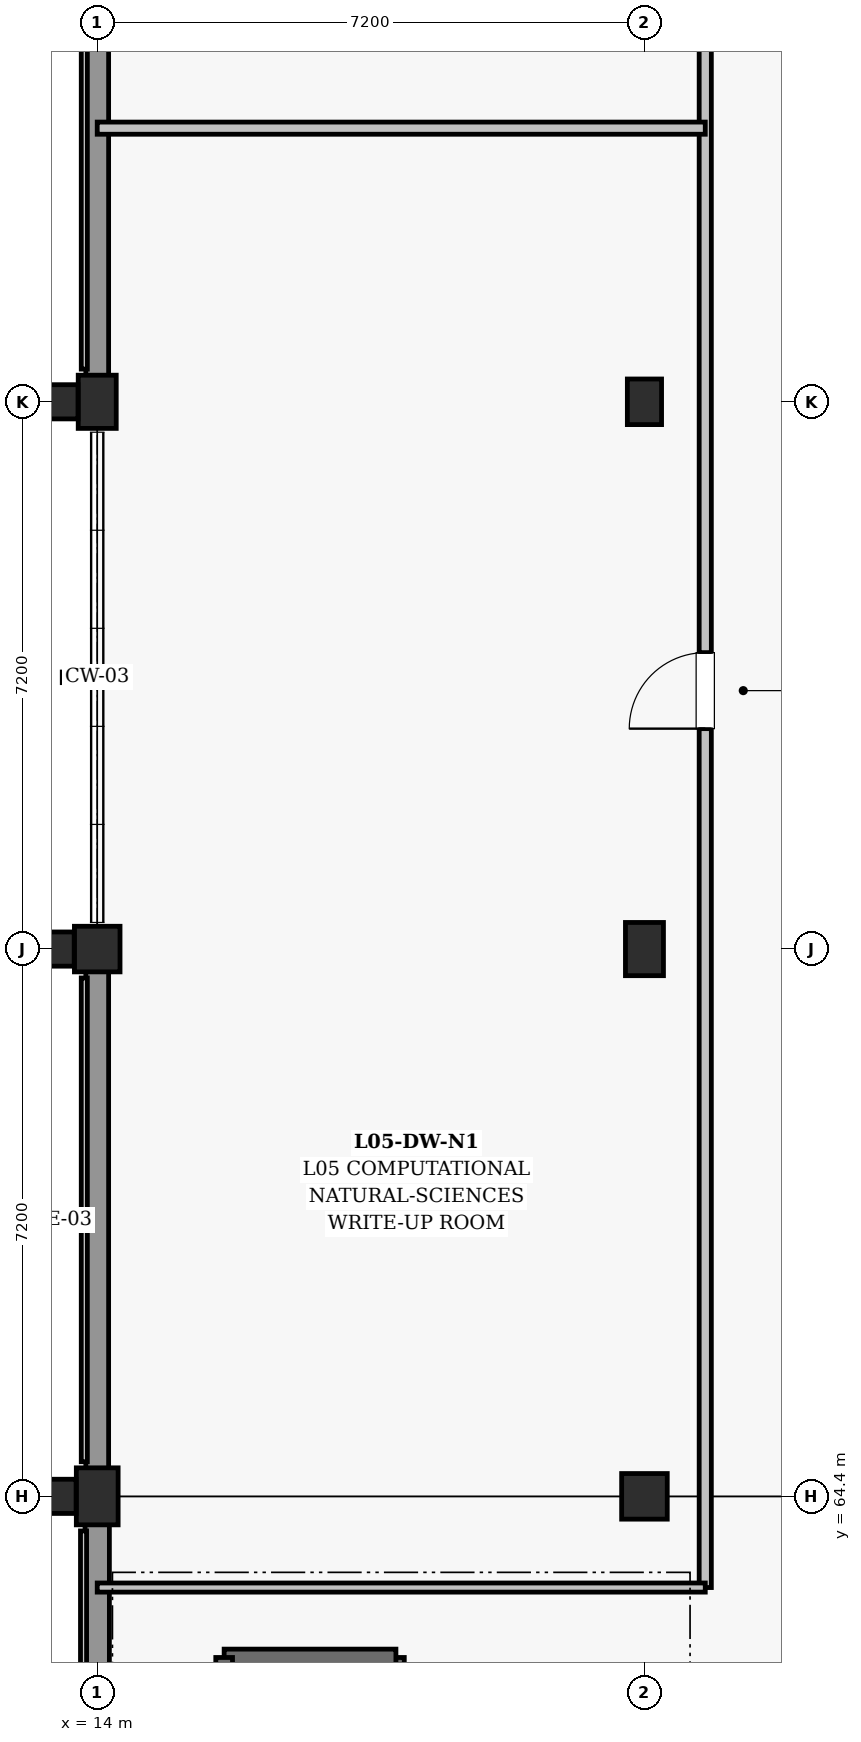
"""IFC4 building model, lengths in metres.
Left out: names, types, materials, properties, quantities, classifications, styles, units other than length and angle.
Written with IfcOpenShell. Run it as: python <this file> out.ifc"""

import sys

from ifc_helpers import new_model, si_unit, direction, frame, frame_2d, origin, origin_2d, place, context, subcontext, project, spatial, rectangle, extrude, element, fill, save


model = new_model("IFC4")
c1 = context("Model", 3, precision=1e-05, world=origin(), true_north=direction((0.0, 1.0)))
c2 = subcontext(c1, "Body", "Model", "MODEL_VIEW")
j1 = project(units=[si_unit("LENGTHUNIT", "METRE"), si_unit("PLANEANGLEUNIT", "RADIAN")], contexts=[c1])
p1 = place(None, origin())
s1 = spatial("IfcSite", under=j1, at=p1, CompositionType="ELEMENT")
p2 = place(p1, origin())
s2 = spatial("IfcBuilding", under=s1, at=p2, CompositionType="ELEMENT")
p3 = place(p2, frame((0.0, 0.0, 23.4)))
s3 = spatial("IfcBuildingStorey", under=s2, at=p3, CompositionType="ELEMENT", Elevation=23.4)
p4 = place(p3, frame((14.0, 64.4, 0.0), z_axis=(0.0, 0.0, 1.0), x_axis=(1.0, 0.0, 0.0)))
e1 = element("IfcColumn", 1, at=p4, inside=s3, PredefinedType="COLUMN", context=c2, shape_type="SweptSolid", body=[
    extrude(rectangle(XDim=0.55, YDim=0.75, at=origin_2d()), origin(), (0.0, 0.0, 1.0), 4.5),
])
p5 = place(p3, frame((14.0, 71.6, 0.0), z_axis=(0.0, 0.0, 1.0), x_axis=(1.0, 0.0, 0.0)))
e2 = element("IfcColumn", 2, at=p5, inside=s3, PredefinedType="COLUMN", context=c2, shape_type="SweptSolid", body=[
    extrude(rectangle(XDim=0.6, YDim=0.6, at=origin_2d()), origin(), (0.0, 0.0, 1.0), 4.5),
])
p6 = place(p3, frame((14.0, 78.8, 0.0), z_axis=(0.0, 0.0, 1.0), x_axis=(1.0, 0.0, 0.0)))
e3 = element("IfcColumn", 3, at=p6, inside=s3, PredefinedType="COLUMN", context=c2, shape_type="SweptSolid", body=[
    extrude(rectangle(XDim=0.5, YDim=0.7, at=origin_2d()), origin(), (0.0, 0.0, 1.0), 4.5),
])
p7 = place(p3, frame((21.2, 64.4, 0.0), z_axis=(0.0, 0.0, 1.0), x_axis=(1.0, 0.0, 0.0)))
e4 = element("IfcColumn", 4, at=p7, inside=s3, PredefinedType="COLUMN", context=c2, shape_type="SweptSolid", body=[
    extrude(rectangle(XDim=0.6, YDim=0.6, at=origin_2d()), origin(), (0.0, 0.0, 1.0), 4.5),
])
p8 = place(p3, frame((21.2, 71.6, 0.0), z_axis=(0.0, 0.0, 1.0), x_axis=(1.0, 0.0, 0.0)))
e5 = element("IfcColumn", 5, at=p8, inside=s3, PredefinedType="COLUMN", context=c2, shape_type="SweptSolid", body=[
    extrude(rectangle(XDim=0.5, YDim=0.7, at=origin_2d()), origin(), (0.0, 0.0, 1.0), 4.5),
])
p9 = place(p3, frame((21.2, 78.8, 0.0), z_axis=(0.0, 0.0, 1.0), x_axis=(1.0, 0.0, 0.0)))
e6 = element("IfcColumn", 6, at=p9, inside=s3, PredefinedType="COLUMN", context=c2, shape_type="SweptSolid", body=[
    extrude(rectangle(XDim=0.45, YDim=0.6, at=origin_2d()), origin(), (0.0, 0.0, 1.0), 4.5),
])
for number, where, z_axis, x_axis in (
    (7, (13.397, 64.4, 0.0), (0.0, 0.0, 1.0), (0.0, 1.0, 0.0)),
    (8, (13.372, 71.6, 0.0), (0.0, 0.0, 1.0), (0.0, 1.0, 0.0)),
    (9, (13.422, 78.8, 0.0), (0.0, 0.0, 1.0), (0.0, 1.0, 0.0)),
):
    element("IfcColumn", number, at=place(p3, frame(where, z_axis=z_axis, x_axis=x_axis)), inside=s3, PredefinedType="PILASTER", context=c2, shape_type="SweptSolid", body=[
        extrude(rectangle(XDim=0.45, YDim=0.65, at=origin_2d()), origin(), (0.0, 0.0, 1.0), 4.5),
    ])
p10 = place(p3, frame((14.0, 57.455, 0.0), z_axis=(0.0, 0.0, 1.0), x_axis=(0.0, 1.0, 0.0)))
e10 = element("IfcWall", 10, at=p10, inside=s3, PredefinedType="SOLIDWALL", context=c2, shape_type="SweptSolid", body=[
    extrude(rectangle(XDim=6.59, YDim=0.32, at=frame_2d((3.295, 0.0))), origin(), (0.0, 0.0, 1.0), 3.455),
])
p11 = place(p3, frame((14.0, 64.755, 0.0), z_axis=(0.0, 0.0, 1.0), x_axis=(0.0, 1.0, 0.0)))
e11 = element("IfcWall", 11, at=p11, inside=s3, PredefinedType="SOLIDWALL", context=c2, shape_type="SweptSolid", body=[
    extrude(rectangle(XDim=6.565, YDim=0.3, at=frame_2d((3.283, 0.0))), origin(), (0.0, 0.0, 1.0), 3.425),
])
p12 = place(p3, frame((14.0, 79.13, 0.0), z_axis=(0.0, 0.0, 1.0), x_axis=(0.0, 1.0, 0.0)))
e12 = element("IfcWall", 12, at=p12, inside=s3, PredefinedType="SOLIDWALL", context=c2, shape_type="SweptSolid", body=[
    extrude(rectangle(XDim=6.59, YDim=0.3, at=frame_2d((3.295, 0.0))), origin(), (0.0, 0.0, 1.0), 3.375),
])
p13 = place(p3, frame((17.93, 59.72, 0.0), z_axis=(0.0, 0.0, 1.0), x_axis=(0.0, 1.0, 0.0)))
e13 = element("IfcWall", 13, at=p13, inside=s3, PredefinedType="SHEAR", context=c2, shape_type="SweptSolid", body=[
    extrude(rectangle(XDim=2.56, YDim=0.22, at=frame_2d((1.28, 0.0))), origin(), (0.0, 0.0, 1.0), 4.195),
])
p14 = place(p13, frame((0.73, 0.0, 0.0)))
e14 = element("IfcOpeningElement", 14, at=p14, cuts=e13, PredefinedType="OPENING", context=c2, shape_type="SweptSolid", body=[
    extrude(rectangle(XDim=1.1, YDim=2.15, at=frame_2d((0.55, 1.075))), frame((0.0, 0.12, 0.0), z_axis=(0.0, -1.0, 0.0), x_axis=(1.0, 0.0, 0.0)), (0.0, 0.0, 1.0), 0.24),
])
p15 = place(p3, frame((17.93, 62.28, 0.0), z_axis=(0.0, 0.0, 1.0), x_axis=(-1.0, 0.0, 0.0)))
e15 = element("IfcWall", 15, at=p15, inside=s3, PredefinedType="SHEAR", context=c2, shape_type="SweptSolid", body=[
    extrude(rectangle(XDim=2.26, YDim=0.22, at=frame_2d((1.13, 0.0))), origin(), (0.0, 0.0, 1.0), 4.195),
])
p16 = place(p3, frame((15.67, 62.28, 0.0), z_axis=(0.0, 0.0, 1.0), x_axis=(0.0, -1.0, 0.0)))
e16 = element("IfcWall", 16, at=p16, inside=s3, PredefinedType="SHEAR", context=c2, shape_type="SweptSolid", body=[
    extrude(rectangle(XDim=2.56, YDim=0.22, at=frame_2d((1.28, 0.0))), origin(), (0.0, 0.0, 1.0), 4.195),
])
p17 = place(p3, frame((22.0, 63.2, 0.0), z_axis=(0.0, 0.0, 1.0), x_axis=(0.0, 1.0, 0.0)))
e17 = element("IfcWall", 17, at=p17, inside=s3, PredefinedType="PARTITIONING", context=c2, shape_type="SweptSolid", body=[
    extrude(rectangle(XDim=39.6, YDim=0.16, at=frame_2d((19.8, 0.0))), origin(), (0.0, 0.0, 1.0), 3.38),
])
p18 = place(p17, frame((11.3, 0.0, 0.0)))
e18 = element("IfcOpeningElement", 18, at=p18, cuts=e17, PredefinedType="OPENING", context=c2, shape_type="SweptSolid", body=[
    extrude(rectangle(XDim=1.0, YDim=2.15, at=frame_2d((0.5, 1.075))), frame((0.0, 0.09, 0.0), z_axis=(0.0, -1.0, 0.0), x_axis=(1.0, 0.0, 0.0)), (0.0, 0.0, 1.0), 0.18),
])
p19 = place(p17, frame((26.3, 0.0, 0.0)))
e19 = element("IfcOpeningElement", 19, at=p19, cuts=e17, PredefinedType="OPENING", context=c2, shape_type="SweptSolid", body=[
    extrude(rectangle(XDim=1.1, YDim=2.15, at=frame_2d((0.55, 1.075))), frame((0.0, 0.09, 0.0), z_axis=(0.0, -1.0, 0.0), x_axis=(1.0, 0.0, 0.0)), (0.0, 0.0, 1.0), 0.18),
])
p20 = place(p3, frame((14.0, 63.2, 0.0), z_axis=(0.0, 0.0, 1.0), x_axis=(1.0, 0.0, 0.0)))
e20 = element("IfcWall", 20, at=p20, inside=s3, PredefinedType="PARTITIONING", context=c2, shape_type="SweptSolid", body=[
    extrude(rectangle(XDim=8.0, YDim=0.12, at=frame_2d((4.0, 0.0))), origin(), (0.0, 0.0, 1.0), 3.58),
])
p21 = place(p3, frame((14.0, 82.4, 0.0), z_axis=(0.0, 0.0, 1.0), x_axis=(1.0, 0.0, 0.0)))
e21 = element("IfcWall", 21, at=p21, inside=s3, PredefinedType="PARTITIONING", context=c2, shape_type="SweptSolid", body=[
    extrude(rectangle(XDim=8.0, YDim=0.16, at=frame_2d((4.0, 0.0))), origin(), (0.0, 0.0, 1.0), 3.58),
])
p22 = place(p18, origin())
e22 = element("IfcDoor", 22, at=p22, inside=s3, OperationType="SINGLE_SWING_LEFT", PredefinedType="DOOR", context=c2, shape_type="SweptSolid", body=[
    extrude(rectangle(XDim=1.0, YDim=2.15, at=frame_2d((0.5, 1.075))), frame((0.0, 0.025, 0.0), z_axis=(0.0, -1.0, 0.0), x_axis=(1.0, 0.0, 0.0)), (0.0, 0.0, 1.0), 0.05),
])
fill(e18, e22)
save(model, sys.argv[1])
